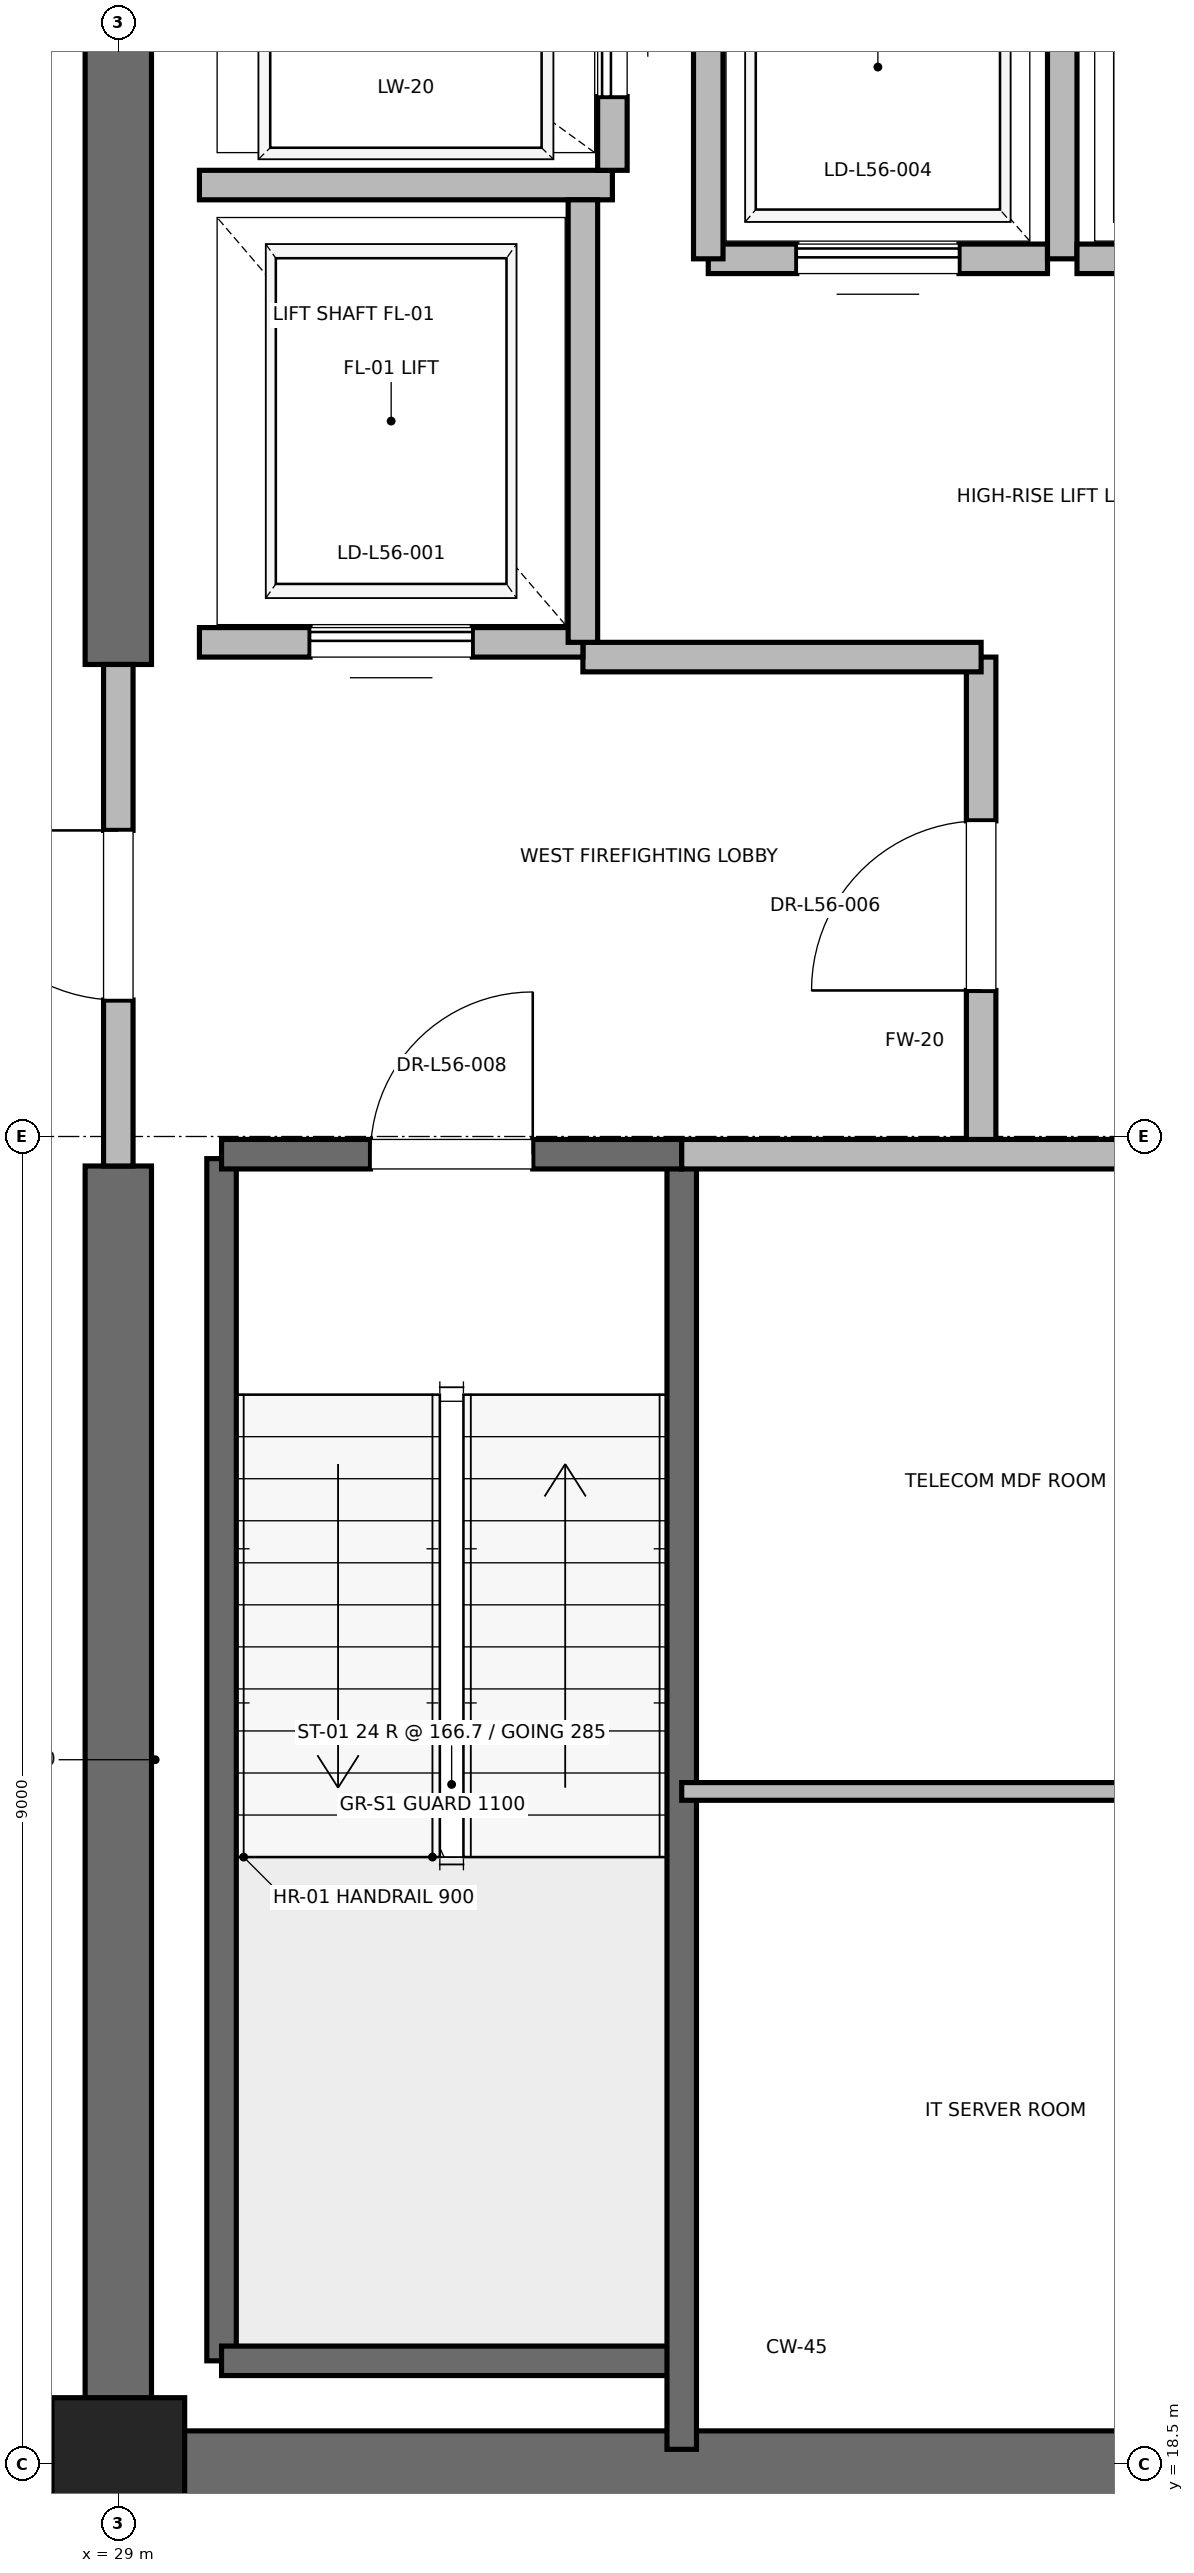
"""IFC4 building model, lengths in metres.
Left out: names, types, materials, properties, quantities, classifications, styles, units other than length and angle.
Written with IfcOpenShell. Run it as: python <this file> out.ifc"""

import sys

from ifc_helpers import new_model, si_unit, direction, frame, frame_2d, origin, origin_2d, place, context, subcontext, project, spatial, rectangle, extrude, element, fill, save


model = new_model("IFC4")
c1 = context("Model", 3, precision=1e-05, world=origin(), true_north=direction((0.0, 1.0)))
c2 = subcontext(c1, "Body", "Model", "MODEL_VIEW")
j1 = project(units=[si_unit("LENGTHUNIT", "METRE"), si_unit("PLANEANGLEUNIT", "RADIAN")], contexts=[c1])
p1 = place(None, origin())
s1 = spatial("IfcSite", under=j1, at=p1, CompositionType="ELEMENT")
p2 = place(p1, origin())
s2 = spatial("IfcBuilding", under=s1, at=p2, CompositionType="ELEMENT")
p3 = place(p2, frame((0.0, 0.0, 243.2)))
s3 = spatial("IfcBuildingStorey", under=s2, at=p3, CompositionType="ELEMENT", Elevation=243.2)
p4 = place(p3, frame((29.0, 18.5, 0.0), z_axis=(0.0, 0.0, 1.0), x_axis=(1.0, 0.0, 0.0)))
e1 = element("IfcColumn", 1, at=p4, inside=s3, PredefinedType="PILASTER", context=c2, shape_type="SweptSolid", body=[
    extrude(rectangle(XDim=0.9, YDim=0.9, at=origin_2d()), origin(), (0.0, 0.0, 1.0), 4.0),
])
p5 = place(p3, frame((29.0, 18.5, 0.0), z_axis=(0.0, 0.0, 1.0), x_axis=(1.0, 0.0, 0.0)))
e2 = element("IfcWall", 2, at=p5, inside=s3, PredefinedType="SHEAR", context=c2, shape_type="SweptSolid", body=[
    extrude(rectangle(XDim=9.2, YDim=0.45, at=frame_2d((4.6, 0.0))), origin(), (0.0, 0.0, 1.0), 3.785),
])
p6 = place(p3, frame((29.0, 18.5, 0.0), z_axis=(0.0, 0.0, 1.0), x_axis=(0.0, 1.0, 0.0)))
e3 = element("IfcWall", 3, at=p6, inside=s3, PredefinedType="SHEAR", context=c2, shape_type="SweptSolid", body=[
    extrude(rectangle(XDim=8.8, YDim=0.45, at=frame_2d((4.4, 0.0))), origin(), (0.0, 0.0, 1.0), 3.785),
])
p7 = place(p3, frame((29.0, 30.7, 0.0), z_axis=(0.0, 0.0, 1.0), x_axis=(0.0, 1.0, 0.0)))
e4 = element("IfcWall", 4, at=p7, inside=s3, PredefinedType="SHEAR", context=c2, shape_type="SweptSolid", body=[
    extrude(rectangle(XDim=5.8, YDim=0.45, at=frame_2d((2.9, 0.0))), origin(), (0.0, 0.0, 1.0), 3.785),
])
p8 = place(p3, frame((29.7, 19.2, 0.0), z_axis=(0.0, 0.0, 1.0), x_axis=(0.0, 1.0, 0.0)))
e5 = element("IfcWall", 5, at=p8, inside=s3, PredefinedType="SOLIDWALL", context=c2, shape_type="SweptSolid", body=[
    extrude(rectangle(XDim=8.15, YDim=0.2, at=frame_2d((4.075, 0.0))), origin(), (0.0, 0.0, 1.0), 3.785),
])
p9 = place(p3, frame((29.7, 19.2, 0.0), z_axis=(0.0, 0.0, 1.0), x_axis=(1.0, 0.0, 0.0)))
e6 = element("IfcWall", 6, at=p9, inside=s3, PredefinedType="SOLIDWALL", context=c2, shape_type="SweptSolid", body=[
    extrude(rectangle(XDim=3.12, YDim=0.2, at=frame_2d((1.56, 0.0))), origin(), (0.0, 0.0, 1.0), 3.785),
])
p10 = place(p3, frame((32.82, 18.6, 0.0), z_axis=(0.0, 0.0, 1.0), x_axis=(0.0, 1.0, 0.0)))
e7 = element("IfcWall", 7, at=p10, inside=s3, PredefinedType="SOLIDWALL", context=c2, shape_type="SweptSolid", body=[
    extrude(rectangle(XDim=8.78, YDim=0.2, at=frame_2d((4.39, 0.0))), origin(), (0.0, 0.0, 1.0), 3.785),
])
p11 = place(p3, frame((29.7, 27.38, 0.0), z_axis=(0.0, 0.0, 1.0), x_axis=(1.0, 0.0, 0.0)))
e8 = element("IfcWall", 8, at=p11, inside=s3, PredefinedType="SOLIDWALL", context=c2, shape_type="SweptSolid", body=[
    extrude(rectangle(XDim=3.12, YDim=0.2, at=frame_2d((1.56, 0.0))), origin(), (0.0, 0.0, 1.0), 3.785),
])
p12 = place(p11, frame((1.01, 0.0, 0.0)))
e9 = element("IfcOpeningElement", 9, at=p12, cuts=e8, PredefinedType="OPENING", context=c2, shape_type="SweptSolid", body=[
    extrude(rectangle(XDim=1.1, YDim=2.15, at=frame_2d((0.55, 1.075))), frame((0.0, 0.1, 0.0), z_axis=(0.0, -1.0, 0.0), x_axis=(1.0, 0.0, 0.0)), (0.0, 0.0, 1.0), 0.2),
])
p13 = place(p3, frame((34.85, 27.38, 0.0), z_axis=(0.0, 0.0, 1.0), x_axis=(0.0, 1.0, 0.0)))
e10 = element("IfcWall", 10, at=p13, inside=s3, PredefinedType="PARTITIONING", context=c2, shape_type="SweptSolid", body=[
    extrude(rectangle(XDim=3.37, YDim=0.2, at=frame_2d((1.685, 0.0))), origin(), (0.0, 0.0, 1.0), 3.785),
])
p14 = place(p13, frame((1.11, 0.0, 0.0)))
e11 = element("IfcOpeningElement", 11, at=p14, cuts=e10, PredefinedType="OPENING", context=c2, shape_type="SweptSolid", body=[
    extrude(rectangle(XDim=1.15, YDim=2.2, at=frame_2d((0.575, 1.1))), frame((0.0, 0.1, 0.0), z_axis=(0.0, -1.0, 0.0), x_axis=(1.0, 0.0, 0.0)), (0.0, 0.0, 1.0), 0.2),
])
p15 = place(p3, frame((29.0, 27.3, 0.0), z_axis=(0.0, 0.0, 1.0), x_axis=(0.0, 1.0, 0.0)))
e12 = element("IfcWall", 12, at=p15, inside=s3, PredefinedType="PARTITIONING", context=c2, shape_type="SweptSolid", body=[
    extrude(rectangle(XDim=3.4, YDim=0.2, at=frame_2d((1.7, 0.0))), origin(), (0.0, 0.0, 1.0), 2.865),
])
p16 = place(p15, frame((1.125, 0.0, 0.0)))
e13 = element("IfcOpeningElement", 13, at=p16, cuts=e12, PredefinedType="OPENING", context=c2, shape_type="SweptSolid", body=[
    extrude(rectangle(XDim=1.15, YDim=2.2, at=frame_2d((0.575, 1.1))), frame((0.0, 0.1, 0.0), z_axis=(0.0, -1.0, 0.0), x_axis=(1.0, 0.0, 0.0)), (0.0, 0.0, 1.0), 0.2),
])
p17 = place(p3, frame((32.82, 27.38, 0.0), z_axis=(0.0, 0.0, 1.0), x_axis=(1.0, 0.0, 0.0)))
e14 = element("IfcWall", 14, at=p17, inside=s3, PredefinedType="PARTITIONING", context=c2, shape_type="SweptSolid", body=[
    extrude(rectangle(XDim=5.62, YDim=0.2, at=frame_2d((2.81, 0.0))), origin(), (0.0, 0.0, 1.0), 3.785),
])
p18 = place(p3, frame((32.15, 30.75, 0.0), z_axis=(0.0, 0.0, 1.0), x_axis=(1.0, 0.0, 0.0)))
e15 = element("IfcWall", 15, at=p18, inside=s3, PredefinedType="PARTITIONING", context=c2, shape_type="SweptSolid", body=[
    extrude(rectangle(XDim=2.7, YDim=0.2, at=frame_2d((1.35, 0.0))), origin(), (0.0, 0.0, 1.0), 3.785),
])
p19 = place(p3, frame((29.55, 30.85, 0.0), z_axis=(0.0, 0.0, 1.0), x_axis=(1.0, 0.0, 0.0)))
e16 = element("IfcWall", 16, at=p19, inside=s3, PredefinedType="SOLIDWALL", context=c2, shape_type="SweptSolid", body=[
    extrude(rectangle(XDim=2.6, YDim=0.2, at=frame_2d((1.3, 0.0))), origin(), (0.0, 0.0, 1.0), 2.865),
])
p20 = place(p19, frame((0.75, 0.0, 0.0)))
e17 = element("IfcOpeningElement", 17, at=p20, cuts=e16, PredefinedType="OPENING", context=c2, shape_type="SweptSolid", body=[
    extrude(rectangle(XDim=1.1, YDim=2.2, at=frame_2d((0.55, 1.1))), frame((0.0, 0.1, 0.0), z_axis=(0.0, -1.0, 0.0), x_axis=(1.0, 0.0, 0.0)), (0.0, 0.0, 1.0), 0.2),
])
p21 = place(p3, frame((29.55, 33.95, 0.0), z_axis=(0.0, 0.0, 1.0), x_axis=(1.0, 0.0, 0.0)))
e18 = element("IfcWall", 18, at=p21, inside=s3, PredefinedType="SOLIDWALL", context=c2, shape_type="SweptSolid", body=[
    extrude(rectangle(XDim=2.8, YDim=0.2, at=frame_2d((1.4, 0.0))), origin(), (0.0, 0.0, 1.0), 3.785),
])
p22 = place(p3, frame((32.15, 30.85, 0.0), z_axis=(0.0, 0.0, 1.0), x_axis=(0.0, 1.0, 0.0)))
e19 = element("IfcWall", 19, at=p22, inside=s3, PredefinedType="SOLIDWALL", context=c2, shape_type="SweptSolid", body=[
    extrude(rectangle(XDim=3.0, YDim=0.2, at=frame_2d((1.5, 0.0))), origin(), (0.0, 0.0, 1.0), 3.785),
])
p23 = place(p3, frame((32.35, 34.05, 0.0), z_axis=(0.0, 0.0, 1.0), x_axis=(0.0, 1.0, 0.0)))
e20 = element("IfcWall", 20, at=p23, inside=s3, PredefinedType="SOLIDWALL", context=c2, shape_type="SweptSolid", body=[
    extrude(rectangle(XDim=2.1, YDim=0.2, at=frame_2d((1.05, 0.0))), origin(), (0.0, 0.0, 1.0), 3.785),
])
p24 = place(p23, frame((0.5, 0.0, 0.0)))
e21 = element("IfcOpeningElement", 21, at=p24, cuts=e20, PredefinedType="OPENING", context=c2, shape_type="SweptSolid", body=[
    extrude(rectangle(XDim=1.1, YDim=2.2, at=frame_2d((0.55, 1.1))), frame((0.0, 0.1, 0.0), z_axis=(0.0, -1.0, 0.0), x_axis=(1.0, 0.0, 0.0)), (0.0, 0.0, 1.0), 0.2),
])
p25 = place(p3, frame((33.0, 33.45, 0.0), z_axis=(0.0, 0.0, 1.0), x_axis=(1.0, 0.0, 0.0)))
e22 = element("IfcWall", 22, at=p25, inside=s3, PredefinedType="SOLIDWALL", context=c2, shape_type="SweptSolid", body=[
    extrude(rectangle(XDim=2.3, YDim=0.2, at=frame_2d((1.15, 0.0))), origin(), (0.0, 0.0, 1.0), 3.785),
])
p26 = place(p25, frame((0.6, 0.0, 0.0)))
e23 = element("IfcOpeningElement", 23, at=p26, cuts=e22, PredefinedType="OPENING", context=c2, shape_type="SweptSolid", body=[
    extrude(rectangle(XDim=1.1, YDim=2.2, at=frame_2d((0.55, 1.1))), frame((0.0, 0.1, 0.0), z_axis=(0.0, -1.0, 0.0), x_axis=(1.0, 0.0, 0.0)), (0.0, 0.0, 1.0), 0.2),
])
p27 = place(p3, frame((33.0, 36.05, 0.0), z_axis=(0.0, 0.0, 1.0), x_axis=(0.0, -1.0, 0.0)))
e24 = element("IfcWall", 24, at=p27, inside=s3, PredefinedType="SOLIDWALL", context=c2, shape_type="SweptSolid", body=[
    extrude(rectangle(XDim=2.6, YDim=0.2, at=frame_2d((1.3, 0.0))), origin(), (0.0, 0.0, 1.0), 3.785),
])
p28 = place(p3, frame((35.4, 33.45, 0.0), z_axis=(0.0, 0.0, 1.0), x_axis=(0.0, 1.0, 0.0)))
e25 = element("IfcWall", 25, at=p28, inside=s3, PredefinedType="SOLIDWALL", context=c2, shape_type="SweptSolid", body=[
    extrude(rectangle(XDim=2.6, YDim=0.2, at=frame_2d((1.3, 0.0))), origin(), (0.0, 0.0, 1.0), 2.865),
])
p29 = place(p3, frame((35.5, 33.45, 0.0), z_axis=(0.0, 0.0, 1.0), x_axis=(1.0, 0.0, 0.0)))
e26 = element("IfcWall", 26, at=p29, inside=s3, PredefinedType="SOLIDWALL", context=c2, shape_type="SweptSolid", body=[
    extrude(rectangle(XDim=2.3, YDim=0.2, at=frame_2d((1.15, 0.0))), origin(), (0.0, 0.0, 1.0), 3.785),
])
p30 = place(p29, frame((0.6, 0.0, 0.0)))
e27 = element("IfcOpeningElement", 27, at=p30, cuts=e26, PredefinedType="OPENING", context=c2, shape_type="SweptSolid", body=[
    extrude(rectangle(XDim=1.1, YDim=2.2, at=frame_2d((0.55, 1.1))), frame((0.0, 0.1, 0.0), z_axis=(0.0, -1.0, 0.0), x_axis=(1.0, 0.0, 0.0)), (0.0, 0.0, 1.0), 0.2),
])
p31 = place(p3, frame((32.82, 23.06, 0.0), z_axis=(0.0, 0.0, 1.0), x_axis=(1.0, 0.0, 0.0)))
e28 = element("IfcWall", 28, at=p31, inside=s3, PredefinedType="PARTITIONING", context=c2, shape_type="SweptSolid", body=[
    extrude(rectangle(XDim=5.23, YDim=0.12, at=frame_2d((2.615, 0.0))), origin(), (0.0, 0.0, 1.0), 2.85),
])
p32 = place(p12, origin())
e29 = element("IfcDoor", 29, at=p32, inside=s3, OperationType="SINGLE_SWING_RIGHT", PredefinedType="DOOR", context=c2, shape_type="SweptSolid", body=[
    extrude(rectangle(XDim=1.1, YDim=2.15, at=frame_2d((0.55, 1.075))), frame((0.0, 0.025, 0.0), z_axis=(0.0, -1.0, 0.0), x_axis=(1.0, 0.0, 0.0)), (0.0, 0.0, 1.0), 0.05),
])
fill(e9, e29)
p33 = place(p14, origin())
e30 = element("IfcDoor", 30, at=p33, inside=s3, OperationType="SINGLE_SWING_LEFT", PredefinedType="DOOR", context=c2, shape_type="SweptSolid", body=[
    extrude(rectangle(XDim=1.15, YDim=2.2, at=frame_2d((0.575, 1.1))), frame((0.0, 0.025, 0.0), z_axis=(0.0, -1.0, 0.0), x_axis=(1.0, 0.0, 0.0)), (0.0, 0.0, 1.0), 0.05),
])
fill(e11, e30)
p34 = place(p16, origin())
e31 = element("IfcDoor", 31, at=p34, inside=s3, OperationType="SINGLE_SWING_RIGHT", PredefinedType="DOOR", context=c2, shape_type="SweptSolid", body=[
    extrude(rectangle(XDim=1.15, YDim=2.2, at=frame_2d((0.575, 1.1))), frame((0.0, 0.025, 0.0), z_axis=(0.0, -1.0, 0.0), x_axis=(1.0, 0.0, 0.0)), (0.0, 0.0, 1.0), 0.05),
])
fill(e13, e31)
p35 = place(p20, origin())
e32 = element("IfcDoor", 32, at=p35, inside=s3, OperationType="SLIDING_TO_RIGHT", PredefinedType="DOOR", context=c2, shape_type="SweptSolid", body=[
    extrude(rectangle(XDim=1.1, YDim=2.2, at=frame_2d((0.55, 1.1))), frame((0.0, 0.025, 0.0), z_axis=(0.0, -1.0, 0.0), x_axis=(1.0, 0.0, 0.0)), (0.0, 0.0, 1.0), 0.05),
])
fill(e17, e32)
p36 = place(p24, origin())
e33 = element("IfcDoor", 33, at=p36, inside=s3, OperationType="SLIDING_TO_RIGHT", PredefinedType="DOOR", context=c2, shape_type="SweptSolid", body=[
    extrude(rectangle(XDim=1.1, YDim=2.2, at=frame_2d((0.55, 1.1))), frame((0.0, 0.025, 0.0), z_axis=(0.0, -1.0, 0.0), x_axis=(1.0, 0.0, 0.0)), (0.0, 0.0, 1.0), 0.05),
])
fill(e21, e33)
p37 = place(p26, origin())
e34 = element("IfcDoor", 34, at=p37, inside=s3, OperationType="SLIDING_TO_RIGHT", PredefinedType="DOOR", context=c2, shape_type="SweptSolid", body=[
    extrude(rectangle(XDim=1.1, YDim=2.2, at=frame_2d((0.55, 1.1))), frame((0.0, 0.025, 0.0), z_axis=(0.0, -1.0, 0.0), x_axis=(1.0, 0.0, 0.0)), (0.0, 0.0, 1.0), 0.05),
])
fill(e23, e34)
save(model, sys.argv[1])
